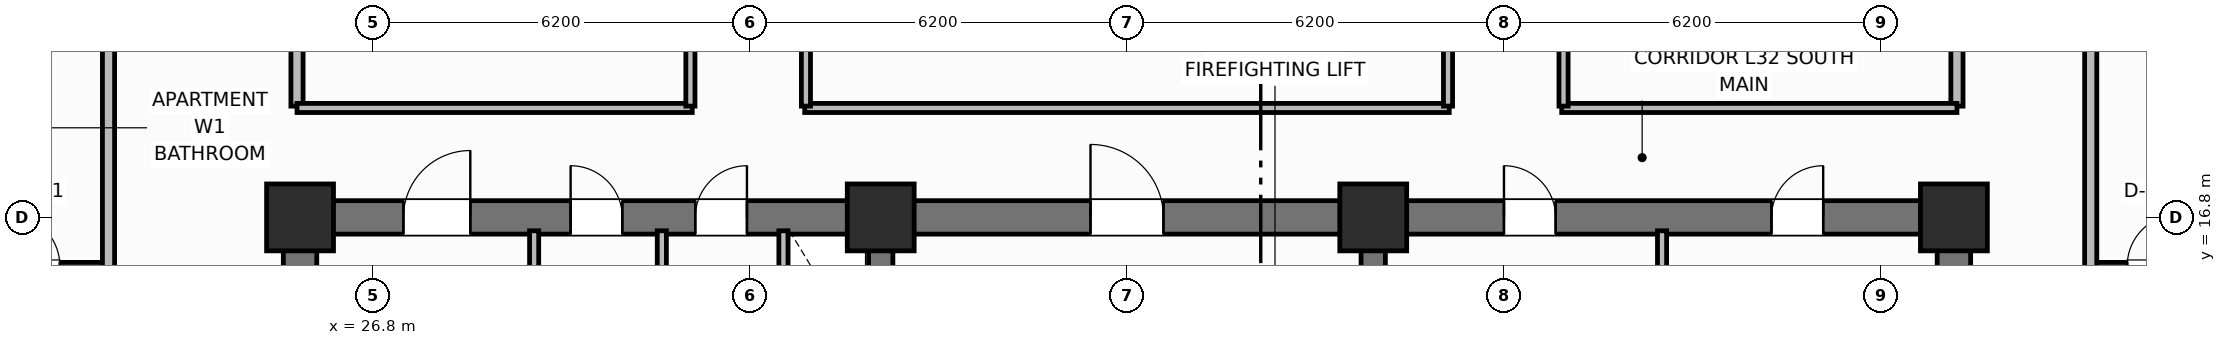
"""IFC4 building model, lengths in metres.
Left out: names, types, materials, properties, quantities, classifications, styles, units other than length and angle.
Written with IfcOpenShell. Run it as: python <this file> out.ifc"""

import sys

from ifc_helpers import new_model, si_unit, direction, frame, frame_2d, origin, origin_2d, place, context, subcontext, project, spatial, rectangle, extrude, element, fill, save


model = new_model("IFC4")
c1 = context("Model", 3, precision=1e-05, world=origin(), true_north=direction((0.0, 1.0)))
c2 = subcontext(c1, "Body", "Model", "MODEL_VIEW")
j1 = project(units=[si_unit("LENGTHUNIT", "METRE"), si_unit("PLANEANGLEUNIT", "RADIAN")], contexts=[c1])
p1 = place(None, origin())
s1 = spatial("IfcSite", under=j1, at=p1, CompositionType="ELEMENT")
p2 = place(p1, origin())
s2 = spatial("IfcBuilding", under=s1, at=p2, CompositionType="ELEMENT")
p3 = place(p2, frame((0.0, 0.0, 129.0)))
s3 = spatial("IfcBuildingStorey", under=s2, at=p3, CompositionType="ELEMENT", Elevation=129.0)
for number, where, z_axis, x_axis in (
    (1, (25.6, 10.875, 0.0), (0.0, 0.0, 1.0), (0.0, 1.0, 0.0)),
    (2, (52.8, 10.875, 0.0), (0.0, 0.0, 1.0), (0.0, 1.0, 0.0)),
):
    element("IfcWall", number, at=place(p3, frame(where, z_axis=z_axis, x_axis=x_axis)), inside=s3, PredefinedType="SHEAR", context=c2, shape_type="SweptSolid", body=[
        extrude(rectangle(XDim=5.65, YDim=0.55, at=frame_2d((2.825, 0.0))), origin(), (0.0, 0.0, 1.0), 3.7),
    ])
p4 = place(p3, frame((25.6, 16.8, 0.0), z_axis=(0.0, 0.0, 1.0), x_axis=(1.0, 0.0, 0.0)))
e3 = element("IfcWall", 3, at=p4, inside=s3, PredefinedType="SHEAR", context=c2, shape_type="SweptSolid", body=[
    extrude(rectangle(XDim=27.2, YDim=0.55, at=frame_2d((13.6, 0.0))), origin(), (0.0, 0.0, 1.0), 3.7),
])
p5 = place(p4, frame((1.7, 0.0, 0.0)))
e4 = element("IfcOpeningElement", 4, at=p5, cuts=e3, PredefinedType="OPENING", context=c2, shape_type="SweptSolid", body=[
    extrude(rectangle(XDim=1.1, YDim=2.15, at=frame_2d((0.55, 1.075))), frame((0.0, 0.285, 0.0), z_axis=(0.0, -1.0, 0.0), x_axis=(1.0, 0.0, 0.0)), (0.0, 0.0, 1.0), 0.57),
])
p6 = place(p4, frame((4.45, 0.0, 0.0)))
e5 = element("IfcOpeningElement", 5, at=p6, cuts=e3, PredefinedType="OPENING", context=c2, shape_type="SweptSolid", body=[
    extrude(rectangle(XDim=0.85, YDim=2.1, at=frame_2d((0.425, 1.05))), frame((0.0, 0.285, 0.0), z_axis=(0.0, -1.0, 0.0), x_axis=(1.0, 0.0, 0.0)), (0.0, 0.0, 1.0), 0.57),
])
p7 = place(p4, frame((6.5, 0.0, 0.0)))
e6 = element("IfcOpeningElement", 6, at=p7, cuts=e3, PredefinedType="OPENING", context=c2, shape_type="SweptSolid", body=[
    extrude(rectangle(XDim=0.85, YDim=2.1, at=frame_2d((0.425, 1.05))), frame((0.0, 0.285, 0.0), z_axis=(0.0, -1.0, 0.0), x_axis=(1.0, 0.0, 0.0)), (0.0, 0.0, 1.0), 0.57),
])
p8 = place(p4, frame((13.0, 0.0, 0.0)))
e7 = element("IfcOpeningElement", 7, at=p8, cuts=e3, PredefinedType="OPENING", context=c2, shape_type="SweptSolid", body=[
    extrude(rectangle(XDim=1.2, YDim=2.15, at=frame_2d((0.6, 1.075))), frame((0.0, 0.285, 0.0), z_axis=(0.0, -1.0, 0.0), x_axis=(1.0, 0.0, 0.0)), (0.0, 0.0, 1.0), 0.57),
])
p9 = place(p4, frame((19.8, 0.0, 0.0)))
e8 = element("IfcOpeningElement", 8, at=p9, cuts=e3, PredefinedType="OPENING", context=c2, shape_type="SweptSolid", body=[
    extrude(rectangle(XDim=0.85, YDim=2.1, at=frame_2d((0.425, 1.05))), frame((0.0, 0.285, 0.0), z_axis=(0.0, -1.0, 0.0), x_axis=(1.0, 0.0, 0.0)), (0.0, 0.0, 1.0), 0.57),
])
p10 = place(p4, frame((24.2, 0.0, 0.0)))
e9 = element("IfcOpeningElement", 9, at=p10, cuts=e3, PredefinedType="OPENING", context=c2, shape_type="SweptSolid", body=[
    extrude(rectangle(XDim=0.85, YDim=2.1, at=frame_2d((0.425, 1.05))), frame((0.0, 0.285, 0.0), z_axis=(0.0, -1.0, 0.0), x_axis=(1.0, 0.0, 0.0)), (0.0, 0.0, 1.0), 0.57),
])
for number, where, z_axis, x_axis in (
    (10, (35.15, 10.875, 0.0), (0.0, 0.0, 1.0), (0.0, 1.0, 0.0)),
    (11, (43.25, 10.875, 0.0), (0.0, 0.0, 1.0), (0.0, 1.0, 0.0)),
):
    element("IfcWall", number, at=place(p3, frame(where, z_axis=z_axis, x_axis=x_axis)), inside=s3, PredefinedType="SHEAR", context=c2, shape_type="SweptSolid", body=[
        extrude(rectangle(XDim=5.65, YDim=0.4, at=frame_2d((2.825, 0.0))), origin(), (0.0, 0.0, 1.0), 3.7),
    ])
for number, where, z_axis, x_axis in (
    (12, (25.6, 16.8, 0.0), (0.0, 0.0, 1.0), (1.0, 0.0, 0.0)),
    (13, (35.15, 16.8, 0.0), (0.0, 0.0, 1.0), (1.0, 0.0, 0.0)),
    (14, (43.25, 16.8, 0.0), (0.0, 0.0, 1.0), (1.0, 0.0, 0.0)),
    (15, (52.8, 16.8, 0.0), (0.0, 0.0, 1.0), (1.0, 0.0, 0.0)),
):
    element("IfcColumn", number, at=place(p3, frame(where, z_axis=z_axis, x_axis=x_axis)), inside=s3, PredefinedType="COLUMN", context=c2, shape_type="SweptSolid", body=[
        extrude(rectangle(XDim=1.1, YDim=1.1, at=origin_2d()), origin(), (0.0, 0.0, 1.0), 3.7),
    ])
for number, where, z_axis, x_axis in (
    (16, (29.45, 14.5, 0.0), (0.0, 0.0, 1.0), (0.0, 1.0, 0.0)),
    (17, (31.55, 14.5, 0.0), (0.0, 0.0, 1.0), (0.0, 1.0, 0.0)),
):
    element("IfcWall", number, at=place(p3, frame(where, z_axis=z_axis, x_axis=x_axis)), inside=s3, PredefinedType="PARTITIONING", context=c2, shape_type="SweptSolid", body=[
        extrude(rectangle(XDim=2.08, YDim=0.15, at=frame_2d((1.04, 0.0))), origin(), (0.0, 0.0, 1.0), 2.53),
    ])
p11 = place(p3, frame((33.55, 14.5, 0.0), z_axis=(0.0, 0.0, 1.0), x_axis=(0.0, 1.0, 0.0)))
e18 = element("IfcWall", 18, at=p11, inside=s3, PredefinedType="PARTITIONING", context=c2, shape_type="SweptSolid", body=[
    extrude(rectangle(XDim=2.08, YDim=0.15, at=frame_2d((1.04, 0.0))), origin(), (0.0, 0.0, 1.0), 2.53),
])
p12 = place(p11, frame((0.55, 0.0, 0.0)))
e19 = element("IfcOpeningElement", 19, at=p12, cuts=e18, PredefinedType="OPENING", context=c2, shape_type="SweptSolid", body=[
    extrude(rectangle(XDim=0.85, YDim=2.05, at=frame_2d((0.425, 1.025))), frame((0.0, 0.085, 0.0), z_axis=(0.0, -1.0, 0.0), x_axis=(1.0, 0.0, 0.0)), (0.0, 0.0, 1.0), 0.17),
])
p13 = place(p3, frame((48.0, 10.95, 0.0), z_axis=(0.0, 0.0, 1.0), x_axis=(0.0, 1.0, 0.0)))
e20 = element("IfcWall", 20, at=p13, inside=s3, PredefinedType="PARTITIONING", context=c2, shape_type="SweptSolid", body=[
    extrude(rectangle(XDim=5.63, YDim=0.15, at=frame_2d((2.815, 0.0))), origin(), (0.0, 0.0, 1.0), 2.53),
])
for number, where, z_axis, x_axis in (
    (21, (25.55, 18.63, 0.0), (0.0, 0.0, 1.0), (0.0, 1.0, 0.0)),
    (22, (52.85, 18.63, 0.0), (0.0, 0.0, 1.0), (0.0, 1.0, 0.0)),
):
    element("IfcWall", number, at=place(p3, frame(where, z_axis=z_axis, x_axis=x_axis)), inside=s3, PredefinedType="PARTITIONING", context=c2, shape_type="SweptSolid", body=[
        extrude(rectangle(XDim=19.14, YDim=0.2, at=frame_2d((9.57, 0.0))), origin(), (0.0, 0.0, 1.0), 2.53),
    ])
p14 = place(p3, frame((25.55, 18.6, 0.0), z_axis=(0.0, 0.0, 1.0), x_axis=(1.0, 0.0, 0.0)))
e23 = element("IfcWall", 23, at=p14, inside=s3, PredefinedType="PARTITIONING", context=c2, shape_type="SweptSolid", body=[
    extrude(rectangle(XDim=6.5, YDim=0.15, at=frame_2d((3.25, 0.0))), origin(), (0.0, 0.0, 1.0), 2.53),
])
p15 = place(p3, frame((33.9, 18.6, 0.0), z_axis=(0.0, 0.0, 1.0), x_axis=(1.0, 0.0, 0.0)))
e24 = element("IfcWall", 24, at=p15, inside=s3, PredefinedType="PARTITIONING", context=c2, shape_type="SweptSolid", body=[
    extrude(rectangle(XDim=10.6, YDim=0.15, at=frame_2d((5.3, 0.0))), origin(), (0.0, 0.0, 1.0), 2.53),
])
p16 = place(p3, frame((46.35, 18.6, 0.0), z_axis=(0.0, 0.0, 1.0), x_axis=(1.0, 0.0, 0.0)))
e25 = element("IfcWall", 25, at=p16, inside=s3, PredefinedType="PARTITIONING", context=c2, shape_type="SweptSolid", body=[
    extrude(rectangle(XDim=6.5, YDim=0.15, at=frame_2d((3.25, 0.0))), origin(), (0.0, 0.0, 1.0), 2.53),
])
p17 = place(p3, frame((32.02, 18.63, 0.0), z_axis=(0.0, 0.0, 1.0), x_axis=(0.0, 1.0, 0.0)))
e26 = element("IfcWall", 26, at=p17, inside=s3, PredefinedType="PARTITIONING", context=c2, shape_type="SweptSolid", body=[
    extrude(rectangle(XDim=19.14, YDim=0.15, at=frame_2d((9.57, 0.0))), origin(), (0.0, 0.0, 1.0), 2.53),
])
p18 = place(p17, frame((5.0, 0.0, 0.0)))
e27 = element("IfcOpeningElement", 27, at=p18, cuts=e26, PredefinedType="OPENING", context=c2, shape_type="SweptSolid", body=[
    extrude(rectangle(XDim=0.9, YDim=2.1, at=frame_2d((0.45, 1.05))), frame((0.0, 0.085, 0.0), z_axis=(0.0, -1.0, 0.0), x_axis=(1.0, 0.0, 0.0)), (0.0, 0.0, 1.0), 0.17),
])
p19 = place(p3, frame((33.92, 18.63, 0.0), z_axis=(0.0, 0.0, 1.0), x_axis=(0.0, 1.0, 0.0)))
e28 = element("IfcWall", 28, at=p19, inside=s3, PredefinedType="PARTITIONING", context=c2, shape_type="SweptSolid", body=[
    extrude(rectangle(XDim=19.14, YDim=0.15, at=frame_2d((9.57, 0.0))), origin(), (0.0, 0.0, 1.0), 2.53),
])
p20 = place(p19, frame((6.5, 0.0, 0.0)))
e29 = element("IfcOpeningElement", 29, at=p20, cuts=e28, PredefinedType="OPENING", context=c2, shape_type="SweptSolid", body=[
    extrude(rectangle(XDim=1.0, YDim=2.15, at=frame_2d((0.5, 1.075))), frame((0.0, 0.085, 0.0), z_axis=(0.0, -1.0, 0.0), x_axis=(1.0, 0.0, 0.0)), (0.0, 0.0, 1.0), 0.17),
])
p21 = place(p3, frame((44.48, 18.63, 0.0), z_axis=(0.0, 0.0, 1.0), x_axis=(0.0, 1.0, 0.0)))
e30 = element("IfcWall", 30, at=p21, inside=s3, PredefinedType="PARTITIONING", context=c2, shape_type="SweptSolid", body=[
    extrude(rectangle(XDim=19.14, YDim=0.15, at=frame_2d((9.57, 0.0))), origin(), (0.0, 0.0, 1.0), 2.53),
])
p22 = place(p3, frame((46.38, 18.63, 0.0), z_axis=(0.0, 0.0, 1.0), x_axis=(0.0, 1.0, 0.0)))
e31 = element("IfcWall", 31, at=p22, inside=s3, PredefinedType="PARTITIONING", context=c2, shape_type="SweptSolid", body=[
    extrude(rectangle(XDim=19.14, YDim=0.15, at=frame_2d((9.57, 0.0))), origin(), (0.0, 0.0, 1.0), 2.53),
])
p23 = place(p22, frame((3.0, 0.0, 0.0)))
e32 = element("IfcOpeningElement", 32, at=p23, cuts=e31, PredefinedType="OPENING", context=c2, shape_type="SweptSolid", body=[
    extrude(rectangle(XDim=0.9, YDim=2.1, at=frame_2d((0.45, 1.05))), frame((0.0, 0.085, 0.0), z_axis=(0.0, -1.0, 0.0), x_axis=(1.0, 0.0, 0.0)), (0.0, 0.0, 1.0), 0.17),
])
p24 = place(p22, frame((11.5, 0.0, 0.0)))
e33 = element("IfcOpeningElement", 33, at=p24, cuts=e31, PredefinedType="OPENING", context=c2, shape_type="SweptSolid", body=[
    extrude(rectangle(XDim=0.9, YDim=2.1, at=frame_2d((0.45, 1.05))), frame((0.0, 0.085, 0.0), z_axis=(0.0, -1.0, 0.0), x_axis=(1.0, 0.0, 0.0)), (0.0, 0.0, 1.0), 0.17),
])
p25 = place(p3, frame((20.2, 16.0, 0.0), z_axis=(0.0, 0.0, 1.0), x_axis=(1.0, 0.0, 0.0)))
e34 = element("IfcWall", 34, at=p25, inside=s3, PredefinedType="PARTITIONING", context=c2, shape_type="SweptSolid", body=[
    extrude(rectangle(XDim=2.25, YDim=0.12, at=frame_2d((1.125, 0.0))), origin(), (0.0, 0.0, 1.0), 2.53),
])
p26 = place(p25, frame((0.6, 0.0, 0.0)))
e35 = element("IfcOpeningElement", 35, at=p26, cuts=e34, PredefinedType="OPENING", context=c2, shape_type="SweptSolid", body=[
    extrude(rectangle(XDim=0.85, YDim=2.1, at=frame_2d((0.425, 1.05))), frame((0.0, 0.07, 0.0), z_axis=(0.0, -1.0, 0.0), x_axis=(1.0, 0.0, 0.0)), (0.0, 0.0, 1.0), 0.14),
])
p27 = place(p3, frame((22.45, 10.6, 0.0), z_axis=(0.0, 0.0, 1.0), x_axis=(0.0, 1.0, 0.0)))
e36 = element("IfcWall", 36, at=p27, inside=s3, PredefinedType="PARTITIONING", context=c2, shape_type="SweptSolid", body=[
    extrude(rectangle(XDim=35.2, YDim=0.2, at=frame_2d((17.6, 0.0))), origin(), (0.0, 0.0, 1.0), 2.53),
])
p28 = place(p27, frame((2.65, 0.0, 0.0)))
e37 = element("IfcOpeningElement", 37, at=p28, cuts=e36, PredefinedType="OPENING", context=c2, shape_type="SweptSolid", body=[
    extrude(rectangle(XDim=1.0, YDim=2.15, at=frame_2d((0.5, 1.075))), frame((0.0, 0.11, 0.0), z_axis=(0.0, -1.0, 0.0), x_axis=(1.0, 0.0, 0.0)), (0.0, 0.0, 1.0), 0.22),
])
p29 = place(p27, frame((19.95, 0.0, 0.0)))
e38 = element("IfcOpeningElement", 38, at=p29, cuts=e36, PredefinedType="OPENING", context=c2, shape_type="SweptSolid", body=[
    extrude(rectangle(XDim=1.0, YDim=2.15, at=frame_2d((0.5, 1.075))), frame((0.0, 0.11, 0.0), z_axis=(0.0, -1.0, 0.0), x_axis=(1.0, 0.0, 0.0)), (0.0, 0.0, 1.0), 0.22),
])
p30 = place(p3, frame((55.05, 16.0, 0.0), z_axis=(0.0, 0.0, 1.0), x_axis=(1.0, 0.0, 0.0)))
e39 = element("IfcWall", 39, at=p30, inside=s3, PredefinedType="PARTITIONING", context=c2, shape_type="SweptSolid", body=[
    extrude(rectangle(XDim=2.25, YDim=0.12, at=frame_2d((1.125, 0.0))), origin(), (0.0, 0.0, 1.0), 2.53),
])
p31 = place(p30, frame((0.6, 0.0, 0.0)))
e40 = element("IfcOpeningElement", 40, at=p31, cuts=e39, PredefinedType="OPENING", context=c2, shape_type="SweptSolid", body=[
    extrude(rectangle(XDim=0.85, YDim=2.1, at=frame_2d((0.425, 1.05))), frame((0.0, 0.07, 0.0), z_axis=(0.0, -1.0, 0.0), x_axis=(1.0, 0.0, 0.0)), (0.0, 0.0, 1.0), 0.14),
])
p32 = place(p3, frame((55.05, 10.6, 0.0), z_axis=(0.0, 0.0, 1.0), x_axis=(0.0, 1.0, 0.0)))
e41 = element("IfcWall", 41, at=p32, inside=s3, PredefinedType="PARTITIONING", context=c2, shape_type="SweptSolid", body=[
    extrude(rectangle(XDim=35.2, YDim=0.2, at=frame_2d((17.6, 0.0))), origin(), (0.0, 0.0, 1.0), 2.53),
])
p33 = place(p32, frame((2.65, 0.0, 0.0)))
e42 = element("IfcOpeningElement", 42, at=p33, cuts=e41, PredefinedType="OPENING", context=c2, shape_type="SweptSolid", body=[
    extrude(rectangle(XDim=1.0, YDim=2.15, at=frame_2d((0.5, 1.075))), frame((0.0, 0.11, 0.0), z_axis=(0.0, -1.0, 0.0), x_axis=(1.0, 0.0, 0.0)), (0.0, 0.0, 1.0), 0.22),
])
p34 = place(p32, frame((22.75, 0.0, 0.0)))
e43 = element("IfcOpeningElement", 43, at=p34, cuts=e41, PredefinedType="OPENING", context=c2, shape_type="SweptSolid", body=[
    extrude(rectangle(XDim=1.0, YDim=2.15, at=frame_2d((0.5, 1.075))), frame((0.0, 0.11, 0.0), z_axis=(0.0, -1.0, 0.0), x_axis=(1.0, 0.0, 0.0)), (0.0, 0.0, 1.0), 0.22),
])
p35 = place(p26, origin())
e44 = element("IfcDoor", 44, at=p35, inside=s3, OperationType="SINGLE_SWING_LEFT", PredefinedType="DOOR", context=c2, shape_type="SweptSolid", body=[
    extrude(rectangle(XDim=0.85, YDim=2.1, at=frame_2d((0.425, 1.05))), frame((0.0, 0.025, 0.0), z_axis=(0.0, -1.0, 0.0), x_axis=(1.0, 0.0, 0.0)), (0.0, 0.0, 1.0), 0.05),
])
fill(e35, e44)
p36 = place(p31, origin())
e45 = element("IfcDoor", 45, at=p36, inside=s3, OperationType="SINGLE_SWING_RIGHT", PredefinedType="DOOR", context=c2, shape_type="SweptSolid", body=[
    extrude(rectangle(XDim=0.85, YDim=2.1, at=frame_2d((0.425, 1.05))), frame((0.0, 0.025, 0.0), z_axis=(0.0, -1.0, 0.0), x_axis=(1.0, 0.0, 0.0)), (0.0, 0.0, 1.0), 0.05),
])
fill(e40, e45)
p37 = place(p5, origin())
e46 = element("IfcDoor", 46, at=p37, inside=s3, OperationType="SINGLE_SWING_RIGHT", PredefinedType="DOOR", context=c2, shape_type="SweptSolid", body=[
    extrude(rectangle(XDim=1.1, YDim=2.15, at=frame_2d((0.55, 1.075))), frame((0.0, 0.025, 0.0), z_axis=(0.0, -1.0, 0.0), x_axis=(1.0, 0.0, 0.0)), (0.0, 0.0, 1.0), 0.05),
])
fill(e4, e46)
p38 = place(p6, origin())
e47 = element("IfcDoor", 47, at=p38, inside=s3, OperationType="SINGLE_SWING_LEFT", PredefinedType="DOOR", context=c2, shape_type="SweptSolid", body=[
    extrude(rectangle(XDim=0.85, YDim=2.1, at=frame_2d((0.425, 1.05))), frame((0.0, 0.025, 0.0), z_axis=(0.0, -1.0, 0.0), x_axis=(1.0, 0.0, 0.0)), (0.0, 0.0, 1.0), 0.05),
])
fill(e5, e47)
p39 = place(p7, origin())
e48 = element("IfcDoor", 48, at=p39, inside=s3, OperationType="SINGLE_SWING_RIGHT", PredefinedType="DOOR", context=c2, shape_type="SweptSolid", body=[
    extrude(rectangle(XDim=0.85, YDim=2.1, at=frame_2d((0.425, 1.05))), frame((0.0, 0.025, 0.0), z_axis=(0.0, -1.0, 0.0), x_axis=(1.0, 0.0, 0.0)), (0.0, 0.0, 1.0), 0.05),
])
fill(e6, e48)
p40 = place(p8, origin())
e49 = element("IfcDoor", 49, at=p40, inside=s3, OperationType="SINGLE_SWING_LEFT", PredefinedType="DOOR", context=c2, shape_type="SweptSolid", body=[
    extrude(rectangle(XDim=1.2, YDim=2.15, at=frame_2d((0.6, 1.075))), frame((0.0, 0.025, 0.0), z_axis=(0.0, -1.0, 0.0), x_axis=(1.0, 0.0, 0.0)), (0.0, 0.0, 1.0), 0.05),
])
fill(e7, e49)
p41 = place(p9, origin())
e50 = element("IfcDoor", 50, at=p41, inside=s3, OperationType="SINGLE_SWING_LEFT", PredefinedType="DOOR", context=c2, shape_type="SweptSolid", body=[
    extrude(rectangle(XDim=0.85, YDim=2.1, at=frame_2d((0.425, 1.05))), frame((0.0, 0.025, 0.0), z_axis=(0.0, -1.0, 0.0), x_axis=(1.0, 0.0, 0.0)), (0.0, 0.0, 1.0), 0.05),
])
fill(e8, e50)
p42 = place(p10, origin())
e51 = element("IfcDoor", 51, at=p42, inside=s3, OperationType="SINGLE_SWING_RIGHT", PredefinedType="DOOR", context=c2, shape_type="SweptSolid", body=[
    extrude(rectangle(XDim=0.85, YDim=2.1, at=frame_2d((0.425, 1.05))), frame((0.0, 0.025, 0.0), z_axis=(0.0, -1.0, 0.0), x_axis=(1.0, 0.0, 0.0)), (0.0, 0.0, 1.0), 0.05),
])
fill(e9, e51)
save(model, sys.argv[1])
